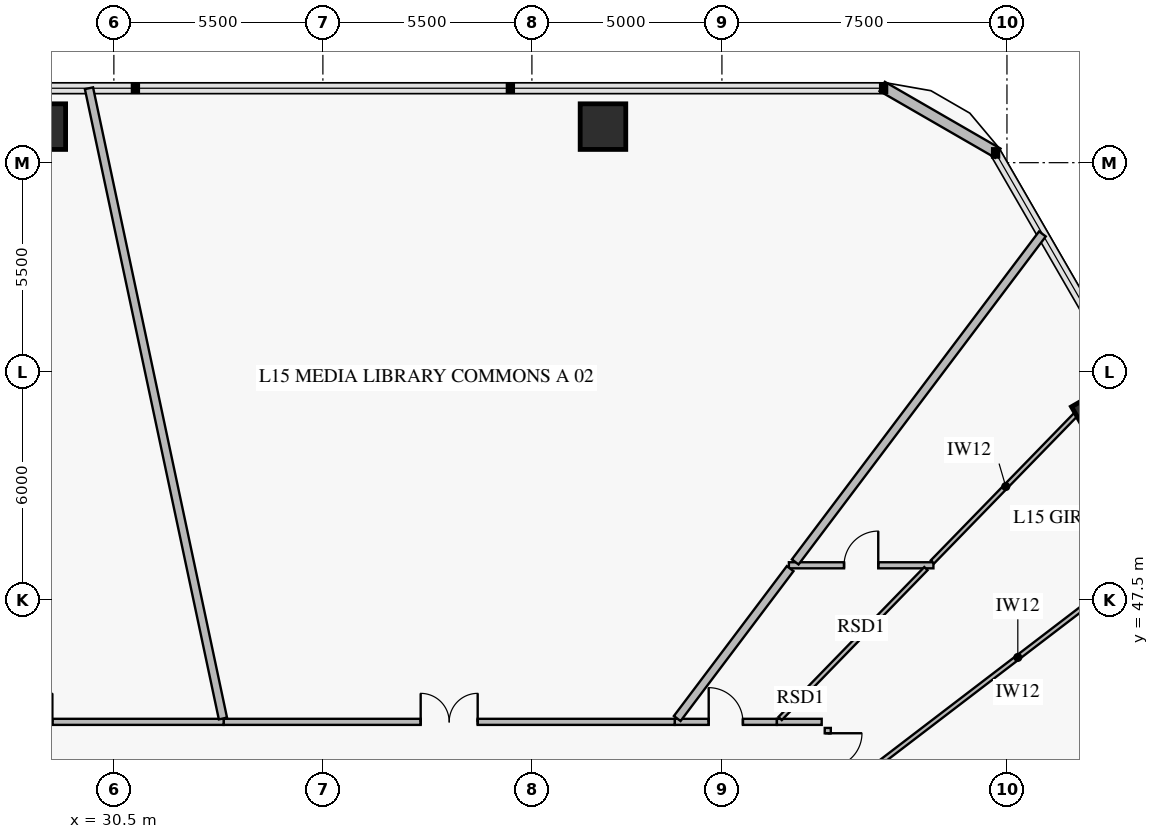
"""IFC4 building model, lengths in metres.
Left out: names, types, materials, properties, quantities, classifications, styles, units other than length and angle.
Written with IfcOpenShell. Run it as: python <this file> out.ifc"""

import sys

from ifc_helpers import new_model, si_unit, direction, frame, frame_2d, origin, origin_2d, place, context, subcontext, project, spatial, rectangle, extrude, element, fill, save


model = new_model("IFC4")
c1 = context("Model", 3, precision=1e-05, world=origin(), true_north=direction((0.0, 1.0)))
c2 = subcontext(c1, "Body", "Model", "MODEL_VIEW")
j1 = project(units=[si_unit("LENGTHUNIT", "METRE"), si_unit("PLANEANGLEUNIT", "RADIAN")], contexts=[c1])
p1 = place(None, origin())
s1 = spatial("IfcSite", under=j1, at=p1, CompositionType="ELEMENT")
p2 = place(p1, origin())
s2 = spatial("IfcBuilding", under=s1, at=p2, CompositionType="ELEMENT")
p3 = place(p2, frame((0.0, 0.0, 62.4)))
s3 = spatial("IfcBuildingStorey", under=s2, at=p3, CompositionType="ELEMENT", Elevation=62.4)
for number, where, z_axis, x_axis in (
    (1, (56.519, 52.357, 0.0), (0.0, 0.0, 1.0), (-0.5, 0.866, 0.0)),
    (2, (43.37, 59.948, 0.0), (0.0, 0.0, 1.0), (-1.0, 0.0, 0.0)),
    (3, (28.63, 59.948, 0.0), (0.0, 0.0, 1.0), (-1.0, 0.0, 0.0)),
):
    element("IfcColumn", number, at=place(p3, frame(where, z_axis=z_axis, x_axis=x_axis)), inside=s3, PredefinedType="COLUMN", context=c2, shape_type="SweptSolid", body=[
        extrude(rectangle(XDim=1.2, YDim=1.2, at=origin_2d()), origin(), (0.0, 0.0, 1.0), 3.92),
    ])
p4 = place(p3, frame((50.717, 61.006, 0.0), z_axis=(0.0, 0.0, 1.0), x_axis=(0.866007452331, -0.500031091541, 0.0)))
e4 = element("IfcWall", 4, at=p4, inside=s3, PredefinedType="SOLIDWALL", context=c2, shape_type="SweptSolid", body=[
    extrude(rectangle(XDim=3.515, YDim=0.28, at=frame_2d((1.757, 0.0))), origin(), (0.0, 0.0, 1.0), 3.92),
])
p5 = place(p3, frame((49.285, 42.157, 0.0), z_axis=(0.0, 0.0, 1.0), x_axis=(0.0, 1.0, 0.0)))
e5 = element("IfcWall", 5, at=p5, inside=s3, PredefinedType="PARTITIONING", context=c2, shape_type="SweptSolid", body=[
    extrude(rectangle(XDim=1.968, YDim=0.16, at=frame_2d((0.984, 0.0))), origin(), (0.0, 0.0, 1.0), 3.92),
])
p6 = place(p5, frame((0.928, 0.0, 0.0)))
e6 = element("IfcOpeningElement", 6, at=p6, cuts=e5, PredefinedType="OPENING", context=c2, shape_type="SweptSolid", body=[
    extrude(rectangle(XDim=0.9, YDim=2.1, at=frame_2d((0.45, 1.05))), frame((0.0, 0.092, 0.0), z_axis=(0.0, -1.0, 0.0), x_axis=(1.0, 0.0, 0.0)), (0.0, 0.0, 1.0), 0.184),
])
p7 = place(p3, frame((48.262, 48.405, 0.0), z_axis=(0.0, 0.0, 1.0), x_axis=(1.0, 0.0, 0.0)))
e7 = element("IfcWall", 7, at=p7, inside=s3, PredefinedType="PARTITIONING", context=c2, shape_type="SweptSolid", body=[
    extrude(rectangle(XDim=3.803, YDim=0.16, at=frame_2d((1.901, 0.0))), origin(), (0.0, 0.0, 1.0), 3.47),
])
p8 = place(p7, frame((1.451, 0.0, 0.0)))
e8 = element("IfcOpeningElement", 8, at=p8, cuts=e7, PredefinedType="OPENING", context=c2, shape_type="SweptSolid", body=[
    extrude(rectangle(XDim=0.9, YDim=2.1, at=frame_2d((0.45, 1.05))), frame((0.0, 0.092, 0.0), z_axis=(0.0, -1.0, 0.0), x_axis=(1.0, 0.0, 0.0)), (0.0, 0.0, 1.0), 0.184),
])
p9 = place(p3, frame((47.947, 44.285, 0.0), z_axis=(0.0, 0.0, 1.0), x_axis=(-1.0, 0.0, 0.0)))
e9 = element("IfcWall", 9, at=p9, inside=s3, PredefinedType="PARTITIONING", context=c2, shape_type="SweptSolid", body=[
    extrude(rectangle(XDim=2.689, YDim=0.16, at=frame_2d((1.345, 0.0))), origin(), (0.0, 0.0, 1.0), 3.92),
])
p10 = place(p9, frame((0.895, 0.0, 0.0)))
e10 = element("IfcOpeningElement", 10, at=p10, cuts=e9, PredefinedType="OPENING", context=c2, shape_type="SweptSolid", body=[
    extrude(rectangle(XDim=0.9, YDim=2.1, at=frame_2d((0.45, 1.05))), frame((0.0, 0.092, 0.0), z_axis=(0.0, -1.0, 0.0), x_axis=(1.0, 0.0, 0.0)), (0.0, 0.0, 1.0), 0.184),
])
p11 = place(p3, frame((45.257, 44.285, 0.0), z_axis=(0.0, 0.0, 1.0), x_axis=(-1.0, 0.0, 0.0)))
e11 = element("IfcWall", 11, at=p11, inside=s3, PredefinedType="PARTITIONING", context=c2, shape_type="SweptSolid", body=[
    extrude(rectangle(XDim=11.869, YDim=0.16, at=frame_2d((5.934, 0.0))), origin(), (0.0, 0.0, 1.0), 3.22),
])
p12 = place(p11, frame((5.184, 0.0, 0.0)))
e12 = element("IfcOpeningElement", 12, at=p12, cuts=e11, PredefinedType="OPENING", context=c2, shape_type="SweptSolid", body=[
    extrude(rectangle(XDim=1.5, YDim=2.15, at=frame_2d((0.75, 1.075))), frame((0.0, 0.092, 0.0), z_axis=(0.0, -1.0, 0.0), x_axis=(1.0, 0.0, 0.0)), (0.0, 0.0, 1.0), 0.184),
])
p13 = place(p3, frame((33.389, 44.285, 0.0), z_axis=(0.0, 0.0, 1.0), x_axis=(-1.0, 0.0, 0.0)))
e13 = element("IfcWall", 13, at=p13, inside=s3, PredefinedType="PARTITIONING", context=c2, shape_type="SweptSolid", body=[
    extrude(rectangle(XDim=10.514, YDim=0.16, at=frame_2d((5.257, 0.0))), origin(), (0.0, 0.0, 1.0), 3.22),
])
p14 = place(p13, frame((4.507, 0.0, 0.0)))
e14 = element("IfcOpeningElement", 14, at=p14, cuts=e13, PredefinedType="OPENING", context=c2, shape_type="SweptSolid", body=[
    extrude(rectangle(XDim=1.5, YDim=2.15, at=frame_2d((0.75, 1.075))), frame((0.0, 0.092, 0.0), z_axis=(0.0, -1.0, 0.0), x_axis=(1.0, 0.0, 0.0)), (0.0, 0.0, 1.0), 0.184),
])
p15 = place(p3, frame((49.373, 39.413, 0.0), z_axis=(0.0, 0.0, 1.0), x_axis=(0.874620963666, 0.484807353405, 0.0)))
e15 = element("IfcWall", 15, at=p15, inside=s3, PredefinedType="PARTITIONING", context=c2, shape_type="SweptSolid", body=[
    extrude(rectangle(XDim=13.673, YDim=0.22, at=frame_2d((6.836, 0.0))), origin(), (0.0, 0.0, 1.0), 3.17),
])
p16 = place(p3, frame((49.373, 42.225, 0.0), z_axis=(0.0, 0.0, 1.0), x_axis=(0.794422824401, 0.607365109362, 0.0)))
e16 = element("IfcWall", 16, at=p16, inside=s3, PredefinedType="PARTITIONING", context=c2, shape_type="SweptSolid", body=[
    extrude(rectangle(XDim=12.368, YDim=0.12, at=frame_2d((6.184, 0.0))), origin(), (0.0, 0.0, 1.0), 3.17),
])
p17 = place(p3, frame((49.125, 44.285, 0.0), z_axis=(0.0, 0.0, 1.0), x_axis=(-1.0, 0.0, 0.0)))
e17 = element("IfcWall", 17, at=p17, inside=s3, PredefinedType="PARTITIONING", context=c2, shape_type="SweptSolid", body=[
    extrude(rectangle(XDim=1.178, YDim=0.16, at=frame_2d((0.589, 0.0))), origin(), (0.0, 0.0, 1.0), 3.22),
])
p18 = place(p3, frame((48.032, 44.373, 0.0), z_axis=(0.0, 0.0, 1.0), x_axis=(0.697186119011, 0.716890169732, 0.0)))
e18 = element("IfcWall", 18, at=p18, inside=s3, PredefinedType="PARTITIONING", context=c2, shape_type="SweptSolid", body=[
    extrude(rectangle(XDim=5.501, YDim=0.12, at=frame_2d((2.75, 0.0))), origin(), (0.0, 0.0, 1.0), 3.47),
])
p19 = place(p3, frame((52.039, 48.493, 0.0), z_axis=(0.0, 0.0, 1.0), x_axis=(0.697138835877, 0.716936150234, 0.0)))
e19 = element("IfcWall", 19, at=p19, inside=s3, PredefinedType="PARTITIONING", context=c2, shape_type="SweptSolid", body=[
    extrude(rectangle(XDim=5.537, YDim=0.12, at=frame_2d((2.769, 0.0))), origin(), (0.0, 0.0, 1.0), 3.92),
])
p20 = place(p3, frame((45.324, 44.373, 0.0), z_axis=(0.0, 0.0, 1.0), x_axis=(0.601817794095, 0.798633421984, 0.0)))
e20 = element("IfcWall", 20, at=p20, inside=s3, PredefinedType="PARTITIONING", context=c2, shape_type="SweptSolid", body=[
    extrude(rectangle(XDim=4.938, YDim=0.22, at=frame_2d((2.469, 0.0))), origin(), (0.0, 0.0, 1.0), 3.92),
])
p21 = place(p3, frame((48.428, 48.493, 0.0), z_axis=(0.0, 0.0, 1.0), x_axis=(0.601802006389, 0.798645318715, 0.0)))
e21 = element("IfcWall", 21, at=p21, inside=s3, PredefinedType="PARTITIONING", context=c2, shape_type="SweptSolid", body=[
    extrude(rectangle(XDim=10.808, YDim=0.22, at=frame_2d((5.404, 0.0))), origin(), (0.0, 0.0, 1.0), 3.17),
])
p22 = place(p3, frame((33.37, 44.373, 0.0), z_axis=(0.0, 0.0, 1.0), x_axis=(-0.207914205497, 0.978147066219, 0.0)))
e22 = element("IfcWall", 22, at=p22, inside=s3, PredefinedType="PARTITIONING", context=c2, shape_type="SweptSolid", body=[
    extrude(rectangle(XDim=16.956, YDim=0.22, at=frame_2d((8.478, 0.0))), origin(), (0.0, 0.0, 1.0), 3.17),
])
p23 = place(p6, frame((0.9, 0.0, 0.0), z_axis=(0.0, 0.0, 1.0), x_axis=(-1.0, 0.0, 0.0)))
e23 = element("IfcDoor", 23, at=p23, inside=s3, OperationType="SINGLE_SWING_LEFT", PredefinedType="DOOR", context=c2, shape_type="SweptSolid", body=[
    extrude(rectangle(XDim=0.9, YDim=2.1, at=frame_2d((0.45, 1.05))), frame((0.0, 0.025, 0.0), z_axis=(0.0, -1.0, 0.0), x_axis=(1.0, 0.0, 0.0)), (0.0, 0.0, 1.0), 0.05),
])
fill(e6, e23)
p24 = place(p8, origin())
e24 = element("IfcDoor", 24, at=p24, inside=s3, OperationType="SINGLE_SWING_RIGHT", PredefinedType="DOOR", context=c2, shape_type="SweptSolid", body=[
    extrude(rectangle(XDim=0.9, YDim=2.1, at=frame_2d((0.45, 1.05))), frame((0.0, 0.025, 0.0), z_axis=(0.0, -1.0, 0.0), x_axis=(1.0, 0.0, 0.0)), (0.0, 0.0, 1.0), 0.05),
])
fill(e8, e24)
p25 = place(p10, frame((0.9, 0.0, 0.0), z_axis=(0.0, 0.0, 1.0), x_axis=(-1.0, 0.0, 0.0)))
e25 = element("IfcDoor", 25, at=p25, inside=s3, OperationType="SINGLE_SWING_LEFT", PredefinedType="DOOR", context=c2, shape_type="SweptSolid", body=[
    extrude(rectangle(XDim=0.9, YDim=2.1, at=frame_2d((0.45, 1.05))), frame((0.0, 0.025, 0.0), z_axis=(0.0, -1.0, 0.0), x_axis=(1.0, 0.0, 0.0)), (0.0, 0.0, 1.0), 0.05),
])
fill(e10, e25)
p26 = place(p12, frame((1.5, 0.0, 0.0), z_axis=(0.0, 0.0, 1.0), x_axis=(-1.0, 0.0, 0.0)))
e26 = element("IfcDoor", 26, at=p26, inside=s3, OperationType="DOUBLE_DOOR_SINGLE_SWING", PredefinedType="DOOR", context=c2, shape_type="SweptSolid", body=[
    extrude(rectangle(XDim=1.5, YDim=2.15, at=frame_2d((0.75, 1.075))), frame((0.0, 0.025, 0.0), z_axis=(0.0, -1.0, 0.0), x_axis=(1.0, 0.0, 0.0)), (0.0, 0.0, 1.0), 0.05),
])
fill(e12, e26)
p27 = place(p14, frame((1.5, 0.0, 0.0), z_axis=(0.0, 0.0, 1.0), x_axis=(-1.0, 0.0, 0.0)))
e27 = element("IfcDoor", 27, at=p27, inside=s3, OperationType="DOUBLE_DOOR_SINGLE_SWING", PredefinedType="DOOR", context=c2, shape_type="SweptSolid", body=[
    extrude(rectangle(XDim=1.5, YDim=2.15, at=frame_2d((0.75, 1.075))), frame((0.0, 0.025, 0.0), z_axis=(0.0, -1.0, 0.0), x_axis=(1.0, 0.0, 0.0)), (0.0, 0.0, 1.0), 0.05),
])
fill(e14, e27)
save(model, sys.argv[1])
